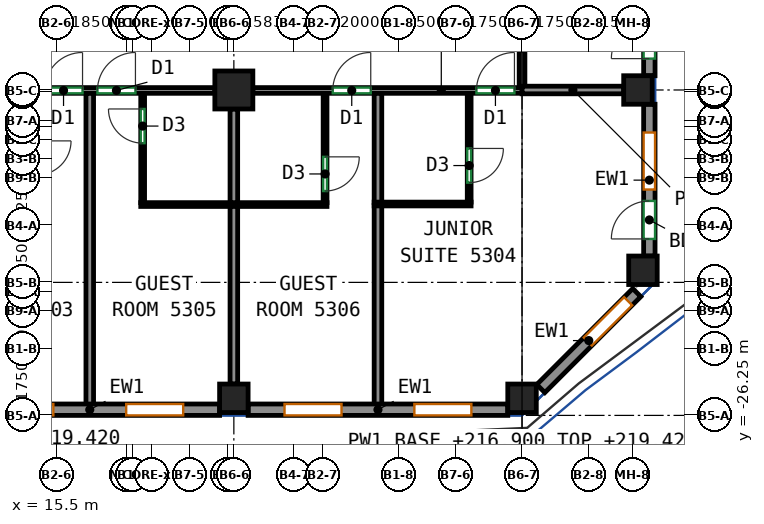
"""IFC4 building model, lengths in metres.
Left out: names, types, materials, properties, quantities, classifications, styles, units other than length and angle.
Written with IfcOpenShell. Run it as: python <this file> out.ifc"""

import sys

from ifc_helpers import new_model, si_unit, direction, frame, frame_2d, origin, origin_2d, place, context, subcontext, project, spatial, rectangle, extrude, source, transform, mapped, element, fill, save


model = new_model("IFC4")
c1 = context("Model", 3, precision=1e-05, world=origin(), true_north=direction((0.0, 1.0)))
c2 = subcontext(c1, "Body", "Model", "MODEL_VIEW")
j1 = project(units=[si_unit("LENGTHUNIT", "METRE"), si_unit("PLANEANGLEUNIT", "RADIAN")], contexts=[c1])
p1 = place(None, origin())
s1 = spatial("IfcSite", under=j1, at=p1, CompositionType="ELEMENT")
p2 = place(p1, origin())
s2 = spatial("IfcBuilding", under=s1, at=p2, CompositionType="ELEMENT")
p3 = place(p2, frame((0.0, 0.0, 216.9)))
s3 = spatial("IfcBuildingStorey", under=s2, at=p3, CompositionType="ELEMENT", Elevation=216.9)
m1 = source(origin(), c2, "Body", "SweptSolid", [
    extrude(rectangle(XDim=0.75, YDim=0.75, at=origin_2d()), origin(), (0.0, 0.0, 1.0), 3.12),
])
p4 = place(p3, frame((20.167, -25.8, 0.0), z_axis=(0.0, 0.0, 1.0), x_axis=(1.0, 0.0, 0.0)))
e1 = element("IfcColumn", 1, at=p4, inside=s3, PredefinedType="COLUMN", context=c2, shape_type="MappedRepresentation", body=[
    mapped(m1, transform((0.0, 0.0, 0.0))),
])
m2 = source(origin(), c2, "Body", "SweptSolid", [
    extrude(rectangle(XDim=1.0, YDim=1.0, at=origin_2d()), origin(), (0.0, 0.0, 1.0), 3.12),
])
p5 = place(p3, frame((20.167, -17.688, 0.0), z_axis=(0.0, 0.0, 1.0), x_axis=(1.0, 0.0, 0.0)))
e2 = element("IfcColumn", 2, at=p5, inside=s3, PredefinedType="COLUMN", context=c2, shape_type="MappedRepresentation", body=[
    mapped(m2, transform((0.0, 0.0, 0.0))),
])
for number, where, z_axis, x_axis in (
    (3, (27.75, -25.8, 0.0), (0.0, 0.0, 1.0), (1.0, 0.0, 0.0)),
    (4, (30.8, -17.688, 0.0), (0.0, 0.0, 1.0), (1.0, 0.0, 0.0)),
    (5, (30.932, -22.432, 0.0), (0.0, 0.0, 1.0), (1.0, 0.0, 0.0)),
):
    element("IfcColumn", number, at=place(p3, frame(where, z_axis=z_axis, x_axis=x_axis)), inside=s3, PredefinedType="COLUMN", context=c2, shape_type="MappedRepresentation", body=[
        mapped(m1, transform((0.0, 0.0, 0.0))),
    ])
m3 = source(origin(), c2, "Body", "SweptSolid", [
    extrude(rectangle(XDim=6.833, YDim=0.3, at=frame_2d((3.417, 0.0))), origin(), (0.0, 0.0, 1.0), 3.12),
])
p6 = place(p3, frame((12.958, -26.1, 0.0), z_axis=(0.0, 0.0, 1.0), x_axis=(1.0, 0.0, 0.0)))
e6 = element("IfcWall", 6, at=p6, inside=s3, PredefinedType="SOLIDWALL", context=c2, shape_type="MappedRepresentation", body=[
    mapped(m3, transform((0.0, 0.0, 0.0))),
])
p7 = place(p6, frame((0.958, 0.0, 0.85)))
e7 = element("IfcOpeningElement", 7, at=p7, cuts=e6, PredefinedType="OPENING", context=c2, shape_type="SweptSolid", body=[
    extrude(rectangle(XDim=1.5, YDim=1.95, at=frame_2d((0.75, 0.975))), frame((0.0, 0.16, 0.0), z_axis=(0.0, -1.0, 0.0), x_axis=(1.0, 0.0, 0.0)), (0.0, 0.0, 1.0), 0.32),
])
p8 = place(p6, frame((4.375, 0.0, 0.85)))
e8 = element("IfcOpeningElement", 8, at=p8, cuts=e6, PredefinedType="OPENING", context=c2, shape_type="SweptSolid", body=[
    extrude(rectangle(XDim=1.5, YDim=1.95, at=frame_2d((0.75, 0.975))), frame((0.0, 0.16, 0.0), z_axis=(0.0, -1.0, 0.0), x_axis=(1.0, 0.0, 0.0)), (0.0, 0.0, 1.0), 0.32),
])
m4 = source(origin(), c2, "Body", "SweptSolid", [
    extrude(rectangle(XDim=6.833, YDim=0.3, at=frame_2d((3.417, 0.0))), origin(), (0.0, 0.0, 1.0), 3.12),
])
p9 = place(p3, frame((20.542, -26.1, 0.0), z_axis=(0.0, 0.0, 1.0), x_axis=(1.0, 0.0, 0.0)))
e9 = element("IfcWall", 9, at=p9, inside=s3, PredefinedType="SOLIDWALL", context=c2, shape_type="MappedRepresentation", body=[
    mapped(m4, transform((0.0, 0.0, 0.0))),
])
p10 = place(p9, frame((0.958, 0.0, 0.85)))
e10 = element("IfcOpeningElement", 10, at=p10, cuts=e9, PredefinedType="OPENING", context=c2, shape_type="SweptSolid", body=[
    extrude(rectangle(XDim=1.5, YDim=1.95, at=frame_2d((0.75, 0.975))), frame((0.0, 0.16, 0.0), z_axis=(0.0, -1.0, 0.0), x_axis=(1.0, 0.0, 0.0)), (0.0, 0.0, 1.0), 0.32),
])
p11 = place(p9, frame((4.375, 0.0, 0.85)))
e11 = element("IfcOpeningElement", 11, at=p11, cuts=e9, PredefinedType="OPENING", context=c2, shape_type="SweptSolid", body=[
    extrude(rectangle(XDim=1.5, YDim=1.95, at=frame_2d((0.75, 0.975))), frame((0.0, 0.16, 0.0), z_axis=(0.0, -1.0, 0.0), x_axis=(1.0, 0.0, 0.0)), (0.0, 0.0, 1.0), 0.32),
])
m5 = source(origin(), c2, "Body", "SweptSolid", [
    extrude(rectangle(XDim=3.571, YDim=0.3, at=frame_2d((1.786, 0.0))), origin(), (0.0, 0.0, 1.0), 3.12),
])
p12 = place(p3, frame((28.244, -25.544, 0.0), z_axis=(0.0, 0.0, 1.0), x_axis=(0.707072595841, 0.707140964879, 0.0)))
e12 = element("IfcWall", 12, at=p12, inside=s3, PredefinedType="SOLIDWALL", context=c2, shape_type="MappedRepresentation", body=[
    mapped(m5, transform((0.0, 0.0, 0.0))),
])
p13 = place(p12, frame((1.75, 0.0, 0.85)))
e13 = element("IfcOpeningElement", 13, at=p13, cuts=e12, PredefinedType="OPENING", context=c2, shape_type="SweptSolid", body=[
    extrude(rectangle(XDim=1.5, YDim=1.95, at=frame_2d((0.75, 0.975))), frame((0.0, 0.16, 0.0), z_axis=(0.0, -1.0, 0.0), x_axis=(1.0, 0.0, 0.0)), (0.0, 0.0, 1.0), 0.32),
])
m6 = source(origin(), c2, "Body", "SweptSolid", [
    extrude(rectangle(XDim=3.994, YDim=0.3, at=frame_2d((1.997, 0.0))), origin(), (0.0, 0.0, 1.0), 3.12),
])
p14 = place(p3, frame((31.1, -22.057, 0.0), z_axis=(0.0, 0.0, 1.0), x_axis=(0.0, 1.0, 0.0)))
e14 = element("IfcWall", 14, at=p14, inside=s3, PredefinedType="SOLIDWALL", context=c2, shape_type="MappedRepresentation", body=[
    mapped(m6, transform((0.0, 0.0, 0.0))),
])
p15 = place(p14, frame((1.75, 0.0, 0.85)))
e15 = element("IfcOpeningElement", 15, at=p15, cuts=e14, PredefinedType="OPENING", context=c2, shape_type="SweptSolid", body=[
    extrude(rectangle(XDim=1.5, YDim=1.95, at=frame_2d((0.75, 0.975))), frame((0.0, 0.16, 0.0), z_axis=(0.0, -1.0, 0.0), x_axis=(1.0, 0.0, 0.0)), (0.0, 0.0, 1.0), 0.32),
])
p16 = place(p14, frame((0.45, 0.0, 0.0)))
e16 = element("IfcOpeningElement", 16, at=p16, cuts=e14, PredefinedType="OPENING", context=c2, shape_type="SweptSolid", body=[
    extrude(rectangle(XDim=1.0, YDim=2.1, at=frame_2d((0.5, 1.05))), frame((0.0, 0.16, 0.0), z_axis=(0.0, -1.0, 0.0), x_axis=(1.0, 0.0, 0.0)), (0.0, 0.0, 1.0), 0.32),
])
m7 = source(origin(), c2, "Body", "SweptSolid", [
    extrude(rectangle(XDim=7.812, YDim=0.3, at=frame_2d((3.906, 0.0))), origin(), (0.0, 0.0, 1.0), 3.12),
])
p17 = place(p3, frame((31.1, -17.312, 0.0), z_axis=(0.0, 0.0, 1.0), x_axis=(0.0, 1.0, 0.0)))
e17 = element("IfcWall", 17, at=p17, inside=s3, PredefinedType="SOLIDWALL", context=c2, shape_type="MappedRepresentation", body=[
    mapped(m7, transform((0.0, 0.0, 0.0))),
])
p18 = place(p17, frame((1.75, 0.0, 0.85)))
e18 = element("IfcOpeningElement", 18, at=p18, cuts=e17, PredefinedType="OPENING", context=c2, shape_type="SweptSolid", body=[
    extrude(rectangle(XDim=1.5, YDim=1.95, at=frame_2d((0.75, 0.975))), frame((0.0, 0.16, 0.0), z_axis=(0.0, -1.0, 0.0), x_axis=(1.0, 0.0, 0.0)), (0.0, 0.0, 1.0), 0.32),
])
p19 = place(p17, frame((0.45, 0.0, 0.0)))
e19 = element("IfcOpeningElement", 19, at=p19, cuts=e17, PredefinedType="OPENING", context=c2, shape_type="SweptSolid", body=[
    extrude(rectangle(XDim=1.0, YDim=2.1, at=frame_2d((0.5, 1.05))), frame((0.0, 0.16, 0.0), z_axis=(0.0, -1.0, 0.0), x_axis=(1.0, 0.0, 0.0)), (0.0, 0.0, 1.0), 0.32),
])
p20 = place(p17, frame((5.656, 0.0, 0.85)))
e20 = element("IfcOpeningElement", 20, at=p20, cuts=e17, PredefinedType="OPENING", context=c2, shape_type="SweptSolid", body=[
    extrude(rectangle(XDim=1.5, YDim=1.95, at=frame_2d((0.75, 0.975))), frame((0.0, 0.16, 0.0), z_axis=(0.0, -1.0, 0.0), x_axis=(1.0, 0.0, 0.0)), (0.0, 0.0, 1.0), 0.32),
])
p21 = place(p17, frame((4.356, 0.0, 0.0)))
e21 = element("IfcOpeningElement", 21, at=p21, cuts=e17, PredefinedType="OPENING", context=c2, shape_type="SweptSolid", body=[
    extrude(rectangle(XDim=1.0, YDim=2.1, at=frame_2d((0.5, 1.05))), frame((0.0, 0.16, 0.0), z_axis=(0.0, -1.0, 0.0), x_axis=(1.0, 0.0, 0.0)), (0.0, 0.0, 1.0), 0.32),
])
p22 = place(p3, frame((13.083, -17.7, 0.0), z_axis=(0.0, 0.0, 1.0), x_axis=(1.0, 0.0, 0.0)))
e22 = element("IfcWall", 22, at=p22, inside=s3, PredefinedType="PARTITIONING", context=c2, shape_type="SweptSolid", body=[
    extrude(rectangle(XDim=6.584, YDim=0.15, at=frame_2d((3.292, 0.0))), origin(), (0.0, 0.0, 1.0), 3.12),
])
p23 = place(p22, frame((2.102, 0.0, 0.0)))
e23 = element("IfcOpeningElement", 23, at=p23, cuts=e22, PredefinedType="OPENING", context=c2, shape_type="SweptSolid", body=[
    extrude(rectangle(XDim=1.0, YDim=2.1, at=frame_2d((0.5, 1.05))), frame((0.0, 0.085, 0.0), z_axis=(0.0, -1.0, 0.0), x_axis=(1.0, 0.0, 0.0)), (0.0, 0.0, 1.0), 0.17),
])
p24 = place(p22, frame((3.494, 0.0, 0.0)))
e24 = element("IfcOpeningElement", 24, at=p24, cuts=e22, PredefinedType="OPENING", context=c2, shape_type="SweptSolid", body=[
    extrude(rectangle(XDim=1.0, YDim=2.1, at=frame_2d((0.5, 1.05))), frame((0.0, 0.085, 0.0), z_axis=(0.0, -1.0, 0.0), x_axis=(1.0, 0.0, 0.0)), (0.0, 0.0, 1.0), 0.17),
])
p25 = place(p3, frame((20.667, -17.7, 0.0), z_axis=(0.0, 0.0, 1.0), x_axis=(1.0, 0.0, 0.0)))
e25 = element("IfcWall", 25, at=p25, inside=s3, PredefinedType="PARTITIONING", context=c2, shape_type="SweptSolid", body=[
    extrude(rectangle(XDim=7.083, YDim=0.15, at=frame_2d((3.542, 0.0))), origin(), (0.0, 0.0, 1.0), 2.52),
])
p26 = place(p25, frame((2.102, 0.0, 0.0)))
e26 = element("IfcOpeningElement", 26, at=p26, cuts=e25, PredefinedType="OPENING", context=c2, shape_type="SweptSolid", body=[
    extrude(rectangle(XDim=1.0, YDim=2.1, at=frame_2d((0.5, 1.05))), frame((0.0, 0.085, 0.0), z_axis=(0.0, -1.0, 0.0), x_axis=(1.0, 0.0, 0.0)), (0.0, 0.0, 1.0), 0.17),
])
p27 = place(p25, frame((5.883, 0.0, 0.0)))
e27 = element("IfcOpeningElement", 27, at=p27, cuts=e25, PredefinedType="OPENING", context=c2, shape_type="SweptSolid", body=[
    extrude(rectangle(XDim=1.0, YDim=2.1, at=frame_2d((0.5, 1.05))), frame((0.0, 0.085, 0.0), z_axis=(0.0, -1.0, 0.0), x_axis=(1.0, 0.0, 0.0)), (0.0, 0.0, 1.0), 0.17),
])
p28 = place(p3, frame((27.75, -17.598, 0.0), z_axis=(0.0, 0.0, 1.0), x_axis=(0.0, 1.0, 0.0)))
e28 = element("IfcWall", 28, at=p28, inside=s3, PredefinedType="PARTITIONING", context=c2, shape_type="SweptSolid", body=[
    extrude(rectangle(XDim=2.023, YDim=0.15, at=frame_2d((1.011, 0.0))), origin(), (0.0, 0.0, 1.0), 2.52),
])
p29 = place(p3, frame((16.375, -26.0, 0.0), z_axis=(0.0, 0.0, 1.0), x_axis=(0.0, 1.0, 0.0)))
e29 = element("IfcWall", 29, at=p29, inside=s3, PredefinedType="PARTITIONING", context=c2, shape_type="SweptSolid", body=[
    extrude(rectangle(XDim=8.223, YDim=0.2, at=frame_2d((4.111, 0.0))), origin(), (0.0, 0.0, 1.0), 3.12),
])
p30 = place(p3, frame((17.767, -20.652, 0.0), z_axis=(0.0, 0.0, 1.0), x_axis=(0.0, 1.0, 0.0)))
e30 = element("IfcWall", 30, at=p30, inside=s3, PredefinedType="PARTITIONING", context=c2, shape_type="SweptSolid", body=[
    extrude(rectangle(XDim=2.875, YDim=0.1, at=frame_2d((1.438, 0.0))), origin(), (0.0, 0.0, 1.0), 3.12),
])
p31 = place(p30, frame((1.565, 0.0, 0.0)))
e31 = element("IfcOpeningElement", 31, at=p31, cuts=e30, PredefinedType="OPENING", context=c2, shape_type="SweptSolid", body=[
    extrude(rectangle(XDim=0.9, YDim=2.1, at=frame_2d((0.45, 1.05))), frame((0.0, 0.06, 0.0), z_axis=(0.0, -1.0, 0.0), x_axis=(1.0, 0.0, 0.0)), (0.0, 0.0, 1.0), 0.12),
])
p32 = place(p3, frame((17.717, -20.702, 0.0), z_axis=(0.0, 0.0, 1.0), x_axis=(1.0, 0.0, 0.0)))
e32 = element("IfcWall", 32, at=p32, inside=s3, PredefinedType="PARTITIONING", context=c2, shape_type="SweptSolid", body=[
    extrude(rectangle(XDim=4.9, YDim=0.1, at=frame_2d((2.45, 0.0))), origin(), (0.0, 0.0, 1.0), 3.12),
])
p33 = place(p3, frame((20.167, -25.425, 0.0), z_axis=(0.0, 0.0, 1.0), x_axis=(0.0, 1.0, 0.0)))
e33 = element("IfcWall", 33, at=p33, inside=s3, PredefinedType="PARTITIONING", context=c2, shape_type="SweptSolid", body=[
    extrude(rectangle(XDim=4.673, YDim=0.2, at=frame_2d((2.336, 0.0))), origin(), (0.0, 0.0, 1.0), 3.12),
])
p34 = place(p3, frame((20.167, -20.652, 0.0), z_axis=(0.0, 0.0, 1.0), x_axis=(0.0, 1.0, 0.0)))
e34 = element("IfcWall", 34, at=p34, inside=s3, PredefinedType="PARTITIONING", context=c2, shape_type="SweptSolid", body=[
    extrude(rectangle(XDim=2.464, YDim=0.2, at=frame_2d((1.232, 0.0))), origin(), (0.0, 0.0, 1.0), 3.12),
])
p35 = place(p3, frame((22.567, -17.777, 0.0), z_axis=(0.0, 0.0, 1.0), x_axis=(0.0, -1.0, 0.0)))
e35 = element("IfcWall", 35, at=p35, inside=s3, PredefinedType="PARTITIONING", context=c2, shape_type="SweptSolid", body=[
    extrude(rectangle(XDim=2.875, YDim=0.1, at=frame_2d((1.438, 0.0))), origin(), (0.0, 0.0, 1.0), 3.12),
])
p36 = place(p35, frame((1.67, 0.0, 0.0)))
e36 = element("IfcOpeningElement", 36, at=p36, cuts=e35, PredefinedType="OPENING", context=c2, shape_type="SweptSolid", body=[
    extrude(rectangle(XDim=0.9, YDim=2.1, at=frame_2d((0.45, 1.05))), frame((0.0, 0.06, 0.0), z_axis=(0.0, -1.0, 0.0), x_axis=(1.0, 0.0, 0.0)), (0.0, 0.0, 1.0), 0.12),
])
p37 = place(p3, frame((23.959, -26.0, 0.0), z_axis=(0.0, 0.0, 1.0), x_axis=(0.0, 1.0, 0.0)))
e37 = element("IfcWall", 37, at=p37, inside=s3, PredefinedType="PARTITIONING", context=c2, shape_type="SweptSolid", body=[
    extrude(rectangle(XDim=5.272, YDim=0.2, at=frame_2d((2.636, 0.0))), origin(), (0.0, 0.0, 1.0), 3.12),
])
p38 = place(p3, frame((23.959, -20.648, 0.0), z_axis=(0.0, 0.0, 1.0), x_axis=(0.0, 1.0, 0.0)))
e38 = element("IfcWall", 38, at=p38, inside=s3, PredefinedType="PARTITIONING", context=c2, shape_type="SweptSolid", body=[
    extrude(rectangle(XDim=2.871, YDim=0.2, at=frame_2d((1.436, 0.0))), origin(), (0.0, 0.0, 1.0), 3.12),
])
p39 = place(p3, frame((23.859, -20.688, 0.0), z_axis=(0.0, 0.0, 1.0), x_axis=(1.0, 0.0, 0.0)))
e39 = element("IfcWall", 39, at=p39, inside=s3, PredefinedType="PARTITIONING", context=c2, shape_type="SweptSolid", body=[
    extrude(rectangle(XDim=2.55, YDim=0.1, at=frame_2d((1.275, 0.0))), origin(), (0.0, 0.0, 1.0), 3.12),
])
p40 = place(p3, frame((26.359, -17.777, 0.0), z_axis=(0.0, 0.0, 1.0), x_axis=(0.0, -1.0, 0.0)))
e40 = element("IfcWall", 40, at=p40, inside=s3, PredefinedType="PARTITIONING", context=c2, shape_type="SweptSolid", body=[
    extrude(rectangle(XDim=2.861, YDim=0.1, at=frame_2d((1.43, 0.0))), origin(), (0.0, 0.0, 1.0), 3.12),
])
p41 = place(p40, frame((1.449, 0.0, 0.0)))
e41 = element("IfcOpeningElement", 41, at=p41, cuts=e40, PredefinedType="OPENING", context=c2, shape_type="SweptSolid", body=[
    extrude(rectangle(XDim=0.9, YDim=2.1, at=frame_2d((0.45, 1.05))), frame((0.0, 0.06, 0.0), z_axis=(0.0, -1.0, 0.0), x_axis=(1.0, 0.0, 0.0)), (0.0, 0.0, 1.0), 0.12),
])
p42 = place(p3, frame((27.752, -17.688, 0.0), z_axis=(0.0, 0.0, 1.0), x_axis=(1.0, 0.0, 0.0)))
e42 = element("IfcWall", 42, at=p42, inside=s3, PredefinedType="PARTITIONING", context=c2, shape_type="SweptSolid", body=[
    extrude(rectangle(XDim=2.673, YDim=0.2, at=frame_2d((1.336, 0.0))), origin(), (0.0, 0.0, 1.0), 2.52),
])
p43 = place(p7, origin())
e43 = element("IfcWindow", 43, at=p43, inside=s3, PartitioningType="SINGLE_PANEL", PredefinedType="WINDOW", context=c2, shape_type="SweptSolid", body=[
    extrude(rectangle(XDim=1.5, YDim=1.95, at=frame_2d((0.75, 0.975))), frame((0.0, 0.03, 0.0), z_axis=(0.0, -1.0, 0.0), x_axis=(1.0, 0.0, 0.0)), (0.0, 0.0, 1.0), 0.06),
])
fill(e7, e43)
p44 = place(p8, origin())
e44 = element("IfcWindow", 44, at=p44, inside=s3, PartitioningType="SINGLE_PANEL", PredefinedType="WINDOW", context=c2, shape_type="SweptSolid", body=[
    extrude(rectangle(XDim=1.5, YDim=1.95, at=frame_2d((0.75, 0.975))), frame((0.0, 0.03, 0.0), z_axis=(0.0, -1.0, 0.0), x_axis=(1.0, 0.0, 0.0)), (0.0, 0.0, 1.0), 0.06),
])
fill(e8, e44)
p45 = place(p10, origin())
e45 = element("IfcWindow", 45, at=p45, inside=s3, PartitioningType="SINGLE_PANEL", PredefinedType="WINDOW", context=c2, shape_type="SweptSolid", body=[
    extrude(rectangle(XDim=1.5, YDim=1.95, at=frame_2d((0.75, 0.975))), frame((0.0, 0.03, 0.0), z_axis=(0.0, -1.0, 0.0), x_axis=(1.0, 0.0, 0.0)), (0.0, 0.0, 1.0), 0.06),
])
fill(e10, e45)
p46 = place(p11, origin())
e46 = element("IfcWindow", 46, at=p46, inside=s3, PartitioningType="SINGLE_PANEL", PredefinedType="WINDOW", context=c2, shape_type="SweptSolid", body=[
    extrude(rectangle(XDim=1.5, YDim=1.95, at=frame_2d((0.75, 0.975))), frame((0.0, 0.03, 0.0), z_axis=(0.0, -1.0, 0.0), x_axis=(1.0, 0.0, 0.0)), (0.0, 0.0, 1.0), 0.06),
])
fill(e11, e46)
p47 = place(p13, origin())
e47 = element("IfcWindow", 47, at=p47, inside=s3, PartitioningType="SINGLE_PANEL", PredefinedType="WINDOW", context=c2, shape_type="SweptSolid", body=[
    extrude(rectangle(XDim=1.5, YDim=1.95, at=frame_2d((0.75, 0.975))), frame((0.0, 0.03, 0.0), z_axis=(0.0, -1.0, 0.0), x_axis=(1.0, 0.0, 0.0)), (0.0, 0.0, 1.0), 0.06),
])
fill(e13, e47)
p48 = place(p15, origin())
e48 = element("IfcWindow", 48, at=p48, inside=s3, PartitioningType="SINGLE_PANEL", PredefinedType="WINDOW", context=c2, shape_type="SweptSolid", body=[
    extrude(rectangle(XDim=1.5, YDim=1.95, at=frame_2d((0.75, 0.975))), frame((0.0, 0.03, 0.0), z_axis=(0.0, -1.0, 0.0), x_axis=(1.0, 0.0, 0.0)), (0.0, 0.0, 1.0), 0.06),
])
fill(e15, e48)
p49 = place(p16, origin())
e49 = element("IfcDoor", 49, at=p49, inside=s3, OperationType="SINGLE_SWING_LEFT", PredefinedType="DOOR", context=c2, shape_type="SweptSolid", body=[
    extrude(rectangle(XDim=1.0, YDim=2.1, at=frame_2d((0.5, 1.05))), frame((0.0, 0.025, 0.0), z_axis=(0.0, -1.0, 0.0), x_axis=(1.0, 0.0, 0.0)), (0.0, 0.0, 1.0), 0.05),
])
fill(e16, e49)
p50 = place(p19, origin())
e50 = element("IfcDoor", 50, at=p50, inside=s3, OperationType="SINGLE_SWING_LEFT", PredefinedType="DOOR", context=c2, shape_type="SweptSolid", body=[
    extrude(rectangle(XDim=1.0, YDim=2.1, at=frame_2d((0.5, 1.05))), frame((0.0, 0.025, 0.0), z_axis=(0.0, -1.0, 0.0), x_axis=(1.0, 0.0, 0.0)), (0.0, 0.0, 1.0), 0.05),
])
fill(e19, e50)
p51 = place(p36, origin())
e51 = element("IfcDoor", 51, at=p51, inside=s3, OperationType="SINGLE_SWING_LEFT", PredefinedType="DOOR", context=c2, shape_type="SweptSolid", body=[
    extrude(rectangle(XDim=0.9, YDim=2.1, at=frame_2d((0.45, 1.05))), frame((0.0, 0.025, 0.0), z_axis=(0.0, -1.0, 0.0), x_axis=(1.0, 0.0, 0.0)), (0.0, 0.0, 1.0), 0.05),
])
fill(e36, e51)
p52 = place(p41, origin())
e52 = element("IfcDoor", 52, at=p52, inside=s3, OperationType="SINGLE_SWING_LEFT", PredefinedType="DOOR", context=c2, shape_type="SweptSolid", body=[
    extrude(rectangle(XDim=0.9, YDim=2.1, at=frame_2d((0.45, 1.05))), frame((0.0, 0.025, 0.0), z_axis=(0.0, -1.0, 0.0), x_axis=(1.0, 0.0, 0.0)), (0.0, 0.0, 1.0), 0.05),
])
fill(e41, e52)
p53 = place(p31, origin())
e53 = element("IfcDoor", 53, at=p53, inside=s3, OperationType="SINGLE_SWING_RIGHT", PredefinedType="DOOR", context=c2, shape_type="SweptSolid", body=[
    extrude(rectangle(XDim=0.9, YDim=2.1, at=frame_2d((0.45, 1.05))), frame((0.0, 0.025, 0.0), z_axis=(0.0, -1.0, 0.0), x_axis=(1.0, 0.0, 0.0)), (0.0, 0.0, 1.0), 0.05),
])
fill(e31, e53)
p54 = place(p23, origin())
e54 = element("IfcDoor", 54, at=p54, inside=s3, OperationType="SINGLE_SWING_RIGHT", PredefinedType="DOOR", context=c2, shape_type="SweptSolid", body=[
    extrude(rectangle(XDim=1.0, YDim=2.1, at=frame_2d((0.5, 1.05))), frame((0.0, 0.025, 0.0), z_axis=(0.0, -1.0, 0.0), x_axis=(1.0, 0.0, 0.0)), (0.0, 0.0, 1.0), 0.05),
])
fill(e23, e54)
p55 = place(p24, origin())
e55 = element("IfcDoor", 55, at=p55, inside=s3, OperationType="SINGLE_SWING_RIGHT", PredefinedType="DOOR", context=c2, shape_type="SweptSolid", body=[
    extrude(rectangle(XDim=1.0, YDim=2.1, at=frame_2d((0.5, 1.05))), frame((0.0, 0.025, 0.0), z_axis=(0.0, -1.0, 0.0), x_axis=(1.0, 0.0, 0.0)), (0.0, 0.0, 1.0), 0.05),
])
fill(e24, e55)
p56 = place(p26, origin())
e56 = element("IfcDoor", 56, at=p56, inside=s3, OperationType="SINGLE_SWING_RIGHT", PredefinedType="DOOR", context=c2, shape_type="SweptSolid", body=[
    extrude(rectangle(XDim=1.0, YDim=2.1, at=frame_2d((0.5, 1.05))), frame((0.0, 0.025, 0.0), z_axis=(0.0, -1.0, 0.0), x_axis=(1.0, 0.0, 0.0)), (0.0, 0.0, 1.0), 0.05),
])
fill(e26, e56)
p57 = place(p27, origin())
e57 = element("IfcDoor", 57, at=p57, inside=s3, OperationType="SINGLE_SWING_RIGHT", PredefinedType="DOOR", context=c2, shape_type="SweptSolid", body=[
    extrude(rectangle(XDim=1.0, YDim=2.1, at=frame_2d((0.5, 1.05))), frame((0.0, 0.025, 0.0), z_axis=(0.0, -1.0, 0.0), x_axis=(1.0, 0.0, 0.0)), (0.0, 0.0, 1.0), 0.05),
])
fill(e27, e57)
save(model, sys.argv[1])
